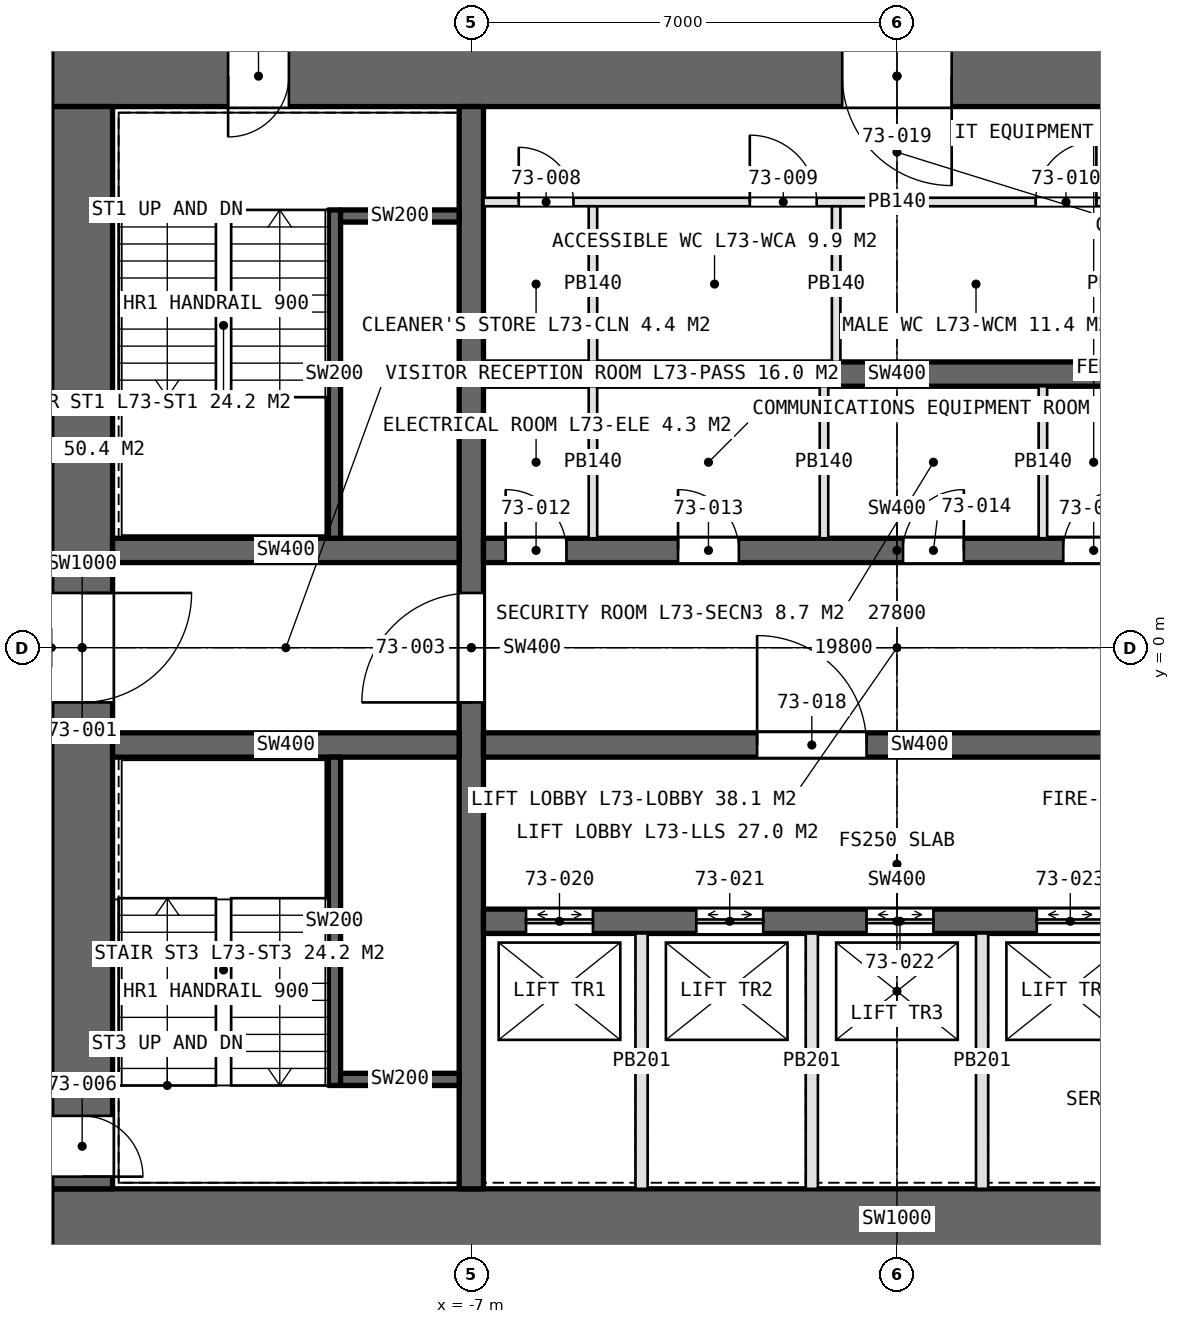
"""IFC4 building model, lengths in metres.
Left out: names, types, materials, properties, quantities, classifications, styles, units other than length and angle.
Written with IfcOpenShell. Run it as: python <this file> out.ifc"""

import sys

from ifc_helpers import new_model, si_unit, direction, frame, frame_2d, origin, place, context, subcontext, project, spatial, rectangle, extrude, element, fill, save


model = new_model("IFC4")
c1 = context("Model", 3, precision=1e-05, world=origin(), true_north=direction((0.0, 1.0)))
c2 = subcontext(c1, "Body", "Model", "MODEL_VIEW")
j1 = project(units=[si_unit("LENGTHUNIT", "METRE"), si_unit("PLANEANGLEUNIT", "RADIAN")], contexts=[c1])
p1 = place(None, origin())
s1 = spatial("IfcSite", under=j1, at=p1, CompositionType="ELEMENT")
p2 = place(p1, origin())
s2 = spatial("IfcBuilding", under=s1, at=p2, CompositionType="ELEMENT")
p3 = place(p2, frame((0.0, 0.0, 325.8)))
s3 = spatial("IfcBuildingStorey", under=s2, at=p3, CompositionType="ELEMENT", Elevation=325.8)
p4 = place(p3, frame((-13.9, -9.4, 0.0), z_axis=(0.0, 0.0, 1.0), x_axis=(1.0, 0.0, 0.0)))
e1 = element("IfcWall", 1, at=p4, inside=s3, PredefinedType="SHEAR", context=c2, shape_type="SweptSolid", body=[
    extrude(rectangle(XDim=27.8, YDim=1.0, at=frame_2d((13.9, 0.0))), origin(), (0.0, 0.0, 1.0), 4.2),
])
p5 = place(p4, frame((22.95, 0.0, 0.0)))
e2 = element("IfcOpeningElement", 2, at=p5, cuts=e1, PredefinedType="OPENING", context=c2, shape_type="SweptSolid", body=[
    extrude(rectangle(XDim=2.2, YDim=2.7, at=frame_2d((1.1, 1.35))), frame((0.0, 0.51, 0.0), z_axis=(0.0, -1.0, 0.0), x_axis=(1.0, 0.0, 0.0)), (0.0, 0.0, 1.0), 1.02),
])
p6 = place(p3, frame((13.9, 9.4, 0.0), z_axis=(0.0, 0.0, 1.0), x_axis=(-1.0, 0.0, 0.0)))
e3 = element("IfcWall", 3, at=p6, inside=s3, PredefinedType="SHEAR", context=c2, shape_type="SweptSolid", body=[
    extrude(rectangle(XDim=27.8, YDim=1.0, at=frame_2d((13.9, 0.0))), origin(), (0.0, 0.0, 1.0), 4.2),
])
p7 = place(p6, frame((23.9, 0.0, 0.0)))
e4 = element("IfcOpeningElement", 4, at=p7, cuts=e3, PredefinedType="OPENING", context=c2, shape_type="SweptSolid", body=[
    extrude(rectangle(XDim=1.0, YDim=2.4, at=frame_2d((0.5, 1.2))), frame((0.0, 0.51, 0.0), z_axis=(0.0, -1.0, 0.0), x_axis=(1.0, 0.0, 0.0)), (0.0, 0.0, 1.0), 1.02),
])
p8 = place(p6, frame((13.0, 0.0, 0.0)))
e5 = element("IfcOpeningElement", 5, at=p8, cuts=e3, PredefinedType="OPENING", context=c2, shape_type="SweptSolid", body=[
    extrude(rectangle(XDim=1.8, YDim=2.4, at=frame_2d((0.9, 1.2))), frame((0.0, 0.51, 0.0), z_axis=(0.0, -1.0, 0.0), x_axis=(1.0, 0.0, 0.0)), (0.0, 0.0, 1.0), 1.02),
])
p9 = place(p3, frame((-13.4, 8.9, 0.0), z_axis=(0.0, 0.0, 1.0), x_axis=(0.0, -1.0, 0.0)))
e6 = element("IfcWall", 6, at=p9, inside=s3, PredefinedType="SHEAR", context=c2, shape_type="SweptSolid", body=[
    extrude(rectangle(XDim=17.8, YDim=1.0, at=frame_2d((8.9, 0.0))), origin(), (0.0, 0.0, 1.0), 4.2),
])
p10 = place(p9, frame((8.0, 0.0, 0.0)))
e7 = element("IfcOpeningElement", 7, at=p10, cuts=e6, PredefinedType="OPENING", context=c2, shape_type="SweptSolid", body=[
    extrude(rectangle(XDim=1.8, YDim=2.4, at=frame_2d((0.9, 1.2))), frame((0.0, 0.51, 0.0), z_axis=(0.0, -1.0, 0.0), x_axis=(1.0, 0.0, 0.0)), (0.0, 0.0, 1.0), 1.02),
])
p11 = place(p9, frame((16.6, 0.0, 0.0)))
e8 = element("IfcOpeningElement", 8, at=p11, cuts=e6, PredefinedType="OPENING", context=c2, shape_type="SweptSolid", body=[
    extrude(rectangle(XDim=1.0, YDim=2.4, at=frame_2d((0.5, 1.2))), frame((0.0, 0.51, 0.0), z_axis=(0.0, -1.0, 0.0), x_axis=(1.0, 0.0, 0.0)), (0.0, 0.0, 1.0), 1.02),
])
p12 = place(p3, frame((-7.0, -8.9, 0.0), z_axis=(0.0, 0.0, 1.0), x_axis=(0.0, 1.0, 0.0)))
e9 = element("IfcWall", 9, at=p12, inside=s3, PredefinedType="SHEAR", context=c2, shape_type="SweptSolid", body=[
    extrude(rectangle(XDim=17.8, YDim=0.4, at=frame_2d((8.9, 0.0))), origin(), (0.0, 0.0, 1.0), 4.2),
])
p13 = place(p12, frame((8.0, 0.0, 0.0)))
e10 = element("IfcOpeningElement", 10, at=p13, cuts=e9, PredefinedType="OPENING", context=c2, shape_type="SweptSolid", body=[
    extrude(rectangle(XDim=1.8, YDim=2.4, at=frame_2d((0.9, 1.2))), frame((0.0, 0.21, 0.0), z_axis=(0.0, -1.0, 0.0), x_axis=(1.0, 0.0, 0.0)), (0.0, 0.0, 1.0), 0.42),
])
p14 = place(p3, frame((-6.8, 1.6, 0.0), z_axis=(0.0, 0.0, 1.0), x_axis=(1.0, 0.0, 0.0)))
e11 = element("IfcWall", 11, at=p14, inside=s3, PredefinedType="SHEAR", context=c2, shape_type="SweptSolid", body=[
    extrude(rectangle(XDim=13.6, YDim=0.4, at=frame_2d((6.8, 0.0))), origin(), (0.0, 0.0, 1.0), 4.2),
])
p15 = place(p14, frame((0.365, 0.0, 0.0)))
e12 = element("IfcOpeningElement", 12, at=p15, cuts=e11, PredefinedType="OPENING", context=c2, shape_type="SweptSolid", body=[
    extrude(rectangle(XDim=1.0, YDim=2.4, at=frame_2d((0.5, 1.2))), frame((0.0, 0.21, 0.0), z_axis=(0.0, -1.0, 0.0), x_axis=(1.0, 0.0, 0.0)), (0.0, 0.0, 1.0), 0.42),
])
p16 = place(p14, frame((3.2, 0.0, 0.0)))
e13 = element("IfcOpeningElement", 13, at=p16, cuts=e11, PredefinedType="OPENING", context=c2, shape_type="SweptSolid", body=[
    extrude(rectangle(XDim=1.0, YDim=2.4, at=frame_2d((0.5, 1.2))), frame((0.0, 0.21, 0.0), z_axis=(0.0, -1.0, 0.0), x_axis=(1.0, 0.0, 0.0)), (0.0, 0.0, 1.0), 0.42),
])
p17 = place(p14, frame((6.9, 0.0, 0.0)))
e14 = element("IfcOpeningElement", 14, at=p17, cuts=e11, PredefinedType="OPENING", context=c2, shape_type="SweptSolid", body=[
    extrude(rectangle(XDim=1.0, YDim=2.4, at=frame_2d((0.5, 1.2))), frame((0.0, 0.21, 0.0), z_axis=(0.0, -1.0, 0.0), x_axis=(1.0, 0.0, 0.0)), (0.0, 0.0, 1.0), 0.42),
])
p18 = place(p14, frame((9.535, 0.0, 0.0)))
e15 = element("IfcOpeningElement", 15, at=p18, cuts=e11, PredefinedType="OPENING", context=c2, shape_type="SweptSolid", body=[
    extrude(rectangle(XDim=1.0, YDim=2.4, at=frame_2d((0.5, 1.2))), frame((0.0, 0.21, 0.0), z_axis=(0.0, -1.0, 0.0), x_axis=(1.0, 0.0, 0.0)), (0.0, 0.0, 1.0), 0.42),
])
p19 = place(p14, frame((11.9, 0.0, 0.0)))
e16 = element("IfcOpeningElement", 16, at=p19, cuts=e11, PredefinedType="OPENING", context=c2, shape_type="SweptSolid", body=[
    extrude(rectangle(XDim=1.0, YDim=2.4, at=frame_2d((0.5, 1.2))), frame((0.0, 0.21, 0.0), z_axis=(0.0, -1.0, 0.0), x_axis=(1.0, 0.0, 0.0)), (0.0, 0.0, 1.0), 0.42),
])
p20 = place(p3, frame((-6.8, -1.6, 0.0), z_axis=(0.0, 0.0, 1.0), x_axis=(1.0, 0.0, 0.0)))
e17 = element("IfcWall", 17, at=p20, inside=s3, PredefinedType="SHEAR", context=c2, shape_type="SweptSolid", body=[
    extrude(rectangle(XDim=13.6, YDim=0.4, at=frame_2d((6.8, 0.0))), origin(), (0.0, 0.0, 1.0), 4.2),
])
p21 = place(p20, frame((11.9, 0.0, 0.0)))
e18 = element("IfcOpeningElement", 18, at=p21, cuts=e17, PredefinedType="OPENING", context=c2, shape_type="SweptSolid", body=[
    extrude(rectangle(XDim=1.0, YDim=2.4, at=frame_2d((0.5, 1.2))), frame((0.0, 0.21, 0.0), z_axis=(0.0, -1.0, 0.0), x_axis=(1.0, 0.0, 0.0)), (0.0, 0.0, 1.0), 0.42),
])
p22 = place(p20, frame((4.5, 0.0, 0.0)))
e19 = element("IfcOpeningElement", 19, at=p22, cuts=e17, PredefinedType="OPENING", context=c2, shape_type="SweptSolid", body=[
    extrude(rectangle(XDim=1.8, YDim=2.4, at=frame_2d((0.9, 1.2))), frame((0.0, 0.21, 0.0), z_axis=(0.0, -1.0, 0.0), x_axis=(1.0, 0.0, 0.0)), (0.0, 0.0, 1.0), 0.42),
])
p23 = place(p3, frame((-6.8, 4.5, 0.0), z_axis=(0.0, 0.0, 1.0), x_axis=(1.0, 0.0, 0.0)))
e20 = element("IfcWall", 20, at=p23, inside=s3, PredefinedType="SHEAR", context=c2, shape_type="SweptSolid", body=[
    extrude(rectangle(XDim=13.6, YDim=0.4, at=frame_2d((6.8, 0.0))), origin(), (0.0, 0.0, 1.0), 4.2),
])
p24 = place(p3, frame((-6.8, -4.5, 0.0), z_axis=(0.0, 0.0, 1.0), x_axis=(1.0, 0.0, 0.0)))
e21 = element("IfcWall", 21, at=p24, inside=s3, PredefinedType="SHEAR", context=c2, shape_type="SweptSolid", body=[
    extrude(rectangle(XDim=13.6, YDim=0.4, at=frame_2d((6.8, 0.0))), origin(), (0.0, 0.0, 1.0), 4.2),
])
p25 = place(p24, frame((0.7, 0.0, 0.0)))
e22 = element("IfcOpeningElement", 22, at=p25, cuts=e21, PredefinedType="OPENING", context=c2, shape_type="SweptSolid", body=[
    extrude(rectangle(XDim=1.1, YDim=2.4, at=frame_2d((0.55, 1.2))), frame((0.0, 0.21, 0.0), z_axis=(0.0, -1.0, 0.0), x_axis=(1.0, 0.0, 0.0)), (0.0, 0.0, 1.0), 0.42),
])
p26 = place(p24, frame((3.5, 0.0, 0.0)))
e23 = element("IfcOpeningElement", 23, at=p26, cuts=e21, PredefinedType="OPENING", context=c2, shape_type="SweptSolid", body=[
    extrude(rectangle(XDim=1.1, YDim=2.4, at=frame_2d((0.55, 1.2))), frame((0.0, 0.21, 0.0), z_axis=(0.0, -1.0, 0.0), x_axis=(1.0, 0.0, 0.0)), (0.0, 0.0, 1.0), 0.42),
])
p27 = place(p24, frame((6.3, 0.0, 0.0)))
e24 = element("IfcOpeningElement", 24, at=p27, cuts=e21, PredefinedType="OPENING", context=c2, shape_type="SweptSolid", body=[
    extrude(rectangle(XDim=1.1, YDim=2.4, at=frame_2d((0.55, 1.2))), frame((0.0, 0.21, 0.0), z_axis=(0.0, -1.0, 0.0), x_axis=(1.0, 0.0, 0.0)), (0.0, 0.0, 1.0), 0.42),
])
p28 = place(p24, frame((9.1, 0.0, 0.0)))
e25 = element("IfcOpeningElement", 25, at=p28, cuts=e21, PredefinedType="OPENING", context=c2, shape_type="SweptSolid", body=[
    extrude(rectangle(XDim=1.1, YDim=2.4, at=frame_2d((0.55, 1.2))), frame((0.0, 0.21, 0.0), z_axis=(0.0, -1.0, 0.0), x_axis=(1.0, 0.0, 0.0)), (0.0, 0.0, 1.0), 0.42),
])
for number, where, z_axis, x_axis in (
    (26, (-12.9, 1.6, 0.0), (0.0, 0.0, 1.0), (1.0, 0.0, 0.0)),
    (27, (-12.9, -1.6, 0.0), (0.0, 0.0, 1.0), (1.0, 0.0, 0.0)),
):
    element("IfcWall", number, at=place(p3, frame(where, z_axis=z_axis, x_axis=x_axis)), inside=s3, PredefinedType="SHEAR", context=c2, shape_type="SweptSolid", body=[
        extrude(rectangle(XDim=5.7, YDim=0.4, at=frame_2d((2.85, 0.0))), origin(), (0.0, 0.0, 1.0), 4.2),
    ])
p29 = place(p3, frame((-6.8, 7.33, 0.0), z_axis=(0.0, 0.0, 1.0), x_axis=(1.0, 0.0, 0.0)))
e28 = element("IfcWall", 28, at=p29, inside=s3, PredefinedType="PARTITIONING", context=c2, shape_type="SweptSolid", body=[
    extrude(rectangle(XDim=13.6, YDim=0.14, at=frame_2d((6.8, 0.0))), origin(), (0.0, 0.0, 1.0), 3.95),
])
p30 = place(p29, frame((0.58, 0.0, 0.0)))
e29 = element("IfcOpeningElement", 29, at=p30, cuts=e28, PredefinedType="OPENING", context=c2, shape_type="SweptSolid", body=[
    extrude(rectangle(XDim=0.9, YDim=2.4, at=frame_2d((0.45, 1.2))), frame((0.0, 0.08, 0.0), z_axis=(0.0, -1.0, 0.0), x_axis=(1.0, 0.0, 0.0)), (0.0, 0.0, 1.0), 0.16),
])
p31 = place(p29, frame((4.38, 0.0, 0.0)))
e30 = element("IfcOpeningElement", 30, at=p31, cuts=e28, PredefinedType="OPENING", context=c2, shape_type="SweptSolid", body=[
    extrude(rectangle(XDim=1.1, YDim=2.4, at=frame_2d((0.55, 1.2))), frame((0.0, 0.08, 0.0), z_axis=(0.0, -1.0, 0.0), x_axis=(1.0, 0.0, 0.0)), (0.0, 0.0, 1.0), 0.16),
])
p32 = place(p29, frame((9.08, 0.0, 0.0)))
e31 = element("IfcOpeningElement", 31, at=p32, cuts=e28, PredefinedType="OPENING", context=c2, shape_type="SweptSolid", body=[
    extrude(rectangle(XDim=1.0, YDim=2.4, at=frame_2d((0.5, 1.2))), frame((0.0, 0.08, 0.0), z_axis=(0.0, -1.0, 0.0), x_axis=(1.0, 0.0, 0.0)), (0.0, 0.0, 1.0), 0.16),
])
p33 = place(p29, frame((12.35, 0.0, 0.0)))
e32 = element("IfcOpeningElement", 32, at=p33, cuts=e28, PredefinedType="OPENING", context=c2, shape_type="SweptSolid", body=[
    extrude(rectangle(XDim=1.0, YDim=2.4, at=frame_2d((0.5, 1.2))), frame((0.0, 0.08, 0.0), z_axis=(0.0, -1.0, 0.0), x_axis=(1.0, 0.0, 0.0)), (0.0, 0.0, 1.0), 0.16),
])
for number, where, z_axis, x_axis in (
    (33, (-5.0, 4.7, 0.0), (0.0, 0.0, 1.0), (0.0, 1.0, 0.0)),
    (34, (-1.0, 4.7, 0.0), (0.0, 0.0, 1.0), (0.0, 1.0, 0.0)),
):
    element("IfcWall", number, at=place(p3, frame(where, z_axis=z_axis, x_axis=x_axis)), inside=s3, PredefinedType="PARTITIONING", context=c2, shape_type="SweptSolid", body=[
        extrude(rectangle(XDim=2.56, YDim=0.14, at=frame_2d((1.28, 0.0))), origin(), (0.0, 0.0, 1.0), 3.95),
    ])
for number, where, z_axis, x_axis in (
    (35, (-5.0, 1.8, 0.0), (0.0, 0.0, 1.0), (0.0, 1.0, 0.0)),
    (36, (-1.2, 1.8, 0.0), (0.0, 0.0, 1.0), (0.0, 1.0, 0.0)),
    (37, (2.4, 1.8, 0.0), (0.0, 0.0, 1.0), (0.0, 1.0, 0.0)),
):
    element("IfcWall", number, at=place(p3, frame(where, z_axis=z_axis, x_axis=x_axis)), inside=s3, PredefinedType="PARTITIONING", context=c2, shape_type="SweptSolid", body=[
        extrude(rectangle(XDim=2.5, YDim=0.14, at=frame_2d((1.25, 0.0))), origin(), (0.0, 0.0, 1.0), 3.95),
    ])
for number, where, z_axis, x_axis in (
    (38, (-4.2, -4.7, 0.0), (0.0, 0.0, 1.0), (0.0, -1.0, 0.0)),
    (39, (-1.4, -4.7, 0.0), (0.0, 0.0, 1.0), (0.0, -1.0, 0.0)),
    (40, (1.4, -4.7, 0.0), (0.0, 0.0, 1.0), (0.0, -1.0, 0.0)),
):
    element("IfcWall", number, at=place(p3, frame(where, z_axis=z_axis, x_axis=x_axis)), inside=s3, PredefinedType="PARTITIONING", context=c2, shape_type="SweptSolid", body=[
        extrude(rectangle(XDim=4.2, YDim=0.2, at=frame_2d((2.1, 0.0))), origin(), (0.0, 0.0, 1.0), 4.2),
    ])
p34 = place(p3, frame((-9.25, 7.2, 0.0), z_axis=(0.0, 0.0, 1.0), x_axis=(0.0, -1.0, 0.0)))
e41 = element("IfcWall", 41, at=p34, inside=s3, PredefinedType="SOLIDWALL", context=c2, shape_type="SweptSolid", body=[
    extrude(rectangle(XDim=5.4, YDim=0.2, at=frame_2d((2.7, 0.0))), origin(), (0.0, 0.0, 1.0), 4.2),
])
p35 = place(p3, frame((-9.15, 7.1, 0.0), z_axis=(0.0, 0.0, 1.0), x_axis=(1.0, 0.0, 0.0)))
e42 = element("IfcWall", 42, at=p35, inside=s3, PredefinedType="SOLIDWALL", context=c2, shape_type="SweptSolid", body=[
    extrude(rectangle(XDim=1.95, YDim=0.2, at=frame_2d((0.975, 0.0))), origin(), (0.0, 0.0, 1.0), 4.2),
])
p36 = place(p3, frame((-9.25, -7.2, 0.0), z_axis=(0.0, 0.0, 1.0), x_axis=(0.0, 1.0, 0.0)))
e43 = element("IfcWall", 43, at=p36, inside=s3, PredefinedType="SOLIDWALL", context=c2, shape_type="SweptSolid", body=[
    extrude(rectangle(XDim=5.4, YDim=0.2, at=frame_2d((2.7, 0.0))), origin(), (0.0, 0.0, 1.0), 4.2),
])
p37 = place(p3, frame((-9.15, -7.1, 0.0), z_axis=(0.0, 0.0, 1.0), x_axis=(1.0, 0.0, 0.0)))
e44 = element("IfcWall", 44, at=p37, inside=s3, PredefinedType="SOLIDWALL", context=c2, shape_type="SweptSolid", body=[
    extrude(rectangle(XDim=1.95, YDim=0.2, at=frame_2d((0.975, 0.0))), origin(), (0.0, 0.0, 1.0), 4.2),
])
p38 = place(p10, origin())
e45 = element("IfcDoor", 45, at=p38, inside=s3, OperationType="DOUBLE_DOOR_SINGLE_SWING", PredefinedType="DOOR", context=c2, shape_type="SweptSolid", body=[
    extrude(rectangle(XDim=1.8, YDim=2.4, at=frame_2d((0.9, 1.2))), frame((0.0, 0.025, 0.0), z_axis=(0.0, -1.0, 0.0), x_axis=(1.0, 0.0, 0.0)), (0.0, 0.0, 1.0), 0.05),
])
fill(e7, e45)
p39 = place(p13, origin())
e46 = element("IfcDoor", 46, at=p39, inside=s3, OperationType="DOUBLE_DOOR_SINGLE_SWING", PredefinedType="DOOR", context=c2, shape_type="SweptSolid", body=[
    extrude(rectangle(XDim=1.8, YDim=2.4, at=frame_2d((0.9, 1.2))), frame((0.0, 0.025, 0.0), z_axis=(0.0, -1.0, 0.0), x_axis=(1.0, 0.0, 0.0)), (0.0, 0.0, 1.0), 0.05),
])
fill(e10, e46)
p40 = place(p7, origin())
e47 = element("IfcDoor", 47, at=p40, inside=s3, OperationType="SINGLE_SWING_RIGHT", PredefinedType="DOOR", context=c2, shape_type="SweptSolid", body=[
    extrude(rectangle(XDim=1.0, YDim=2.4, at=frame_2d((0.5, 1.2))), frame((0.0, 0.025, 0.0), z_axis=(0.0, -1.0, 0.0), x_axis=(1.0, 0.0, 0.0)), (0.0, 0.0, 1.0), 0.05),
])
fill(e4, e47)
p41 = place(p11, origin())
e48 = element("IfcDoor", 48, at=p41, inside=s3, OperationType="SINGLE_SWING_RIGHT", PredefinedType="DOOR", context=c2, shape_type="SweptSolid", body=[
    extrude(rectangle(XDim=1.0, YDim=2.4, at=frame_2d((0.5, 1.2))), frame((0.0, 0.025, 0.0), z_axis=(0.0, -1.0, 0.0), x_axis=(1.0, 0.0, 0.0)), (0.0, 0.0, 1.0), 0.05),
])
fill(e8, e48)
p42 = place(p30, origin())
e49 = element("IfcDoor", 49, at=p42, inside=s3, OperationType="SINGLE_SWING_LEFT", PredefinedType="DOOR", context=c2, shape_type="SweptSolid", body=[
    extrude(rectangle(XDim=0.9, YDim=2.4, at=frame_2d((0.45, 1.2))), frame((0.0, 0.025, 0.0), z_axis=(0.0, -1.0, 0.0), x_axis=(1.0, 0.0, 0.0)), (0.0, 0.0, 1.0), 0.05),
])
fill(e29, e49)
p43 = place(p31, origin())
e50 = element("IfcDoor", 50, at=p43, inside=s3, OperationType="SINGLE_SWING_LEFT", PredefinedType="DOOR", context=c2, shape_type="SweptSolid", body=[
    extrude(rectangle(XDim=1.1, YDim=2.4, at=frame_2d((0.55, 1.2))), frame((0.0, 0.025, 0.0), z_axis=(0.0, -1.0, 0.0), x_axis=(1.0, 0.0, 0.0)), (0.0, 0.0, 1.0), 0.05),
])
fill(e30, e50)
p44 = place(p32, origin())
e51 = element("IfcDoor", 51, at=p44, inside=s3, OperationType="SINGLE_SWING_RIGHT", PredefinedType="DOOR", context=c2, shape_type="SweptSolid", body=[
    extrude(rectangle(XDim=1.0, YDim=2.4, at=frame_2d((0.5, 1.2))), frame((0.0, 0.025, 0.0), z_axis=(0.0, -1.0, 0.0), x_axis=(1.0, 0.0, 0.0)), (0.0, 0.0, 1.0), 0.05),
])
fill(e31, e51)
p45 = place(p15, origin())
e52 = element("IfcDoor", 52, at=p45, inside=s3, OperationType="SINGLE_SWING_LEFT", PredefinedType="DOOR", context=c2, shape_type="SweptSolid", body=[
    extrude(rectangle(XDim=1.0, YDim=2.4, at=frame_2d((0.5, 1.2))), frame((0.0, 0.025, 0.0), z_axis=(0.0, -1.0, 0.0), x_axis=(1.0, 0.0, 0.0)), (0.0, 0.0, 1.0), 0.05),
])
fill(e12, e52)
p46 = place(p16, origin())
e53 = element("IfcDoor", 53, at=p46, inside=s3, OperationType="SINGLE_SWING_LEFT", PredefinedType="DOOR", context=c2, shape_type="SweptSolid", body=[
    extrude(rectangle(XDim=1.0, YDim=2.4, at=frame_2d((0.5, 1.2))), frame((0.0, 0.025, 0.0), z_axis=(0.0, -1.0, 0.0), x_axis=(1.0, 0.0, 0.0)), (0.0, 0.0, 1.0), 0.05),
])
fill(e13, e53)
p47 = place(p17, origin())
e54 = element("IfcDoor", 54, at=p47, inside=s3, OperationType="SINGLE_SWING_RIGHT", PredefinedType="DOOR", context=c2, shape_type="SweptSolid", body=[
    extrude(rectangle(XDim=1.0, YDim=2.4, at=frame_2d((0.5, 1.2))), frame((0.0, 0.025, 0.0), z_axis=(0.0, -1.0, 0.0), x_axis=(1.0, 0.0, 0.0)), (0.0, 0.0, 1.0), 0.05),
])
fill(e14, e54)
p48 = place(p18, origin())
e55 = element("IfcDoor", 55, at=p48, inside=s3, OperationType="SINGLE_SWING_RIGHT", PredefinedType="DOOR", context=c2, shape_type="SweptSolid", body=[
    extrude(rectangle(XDim=1.0, YDim=2.4, at=frame_2d((0.5, 1.2))), frame((0.0, 0.025, 0.0), z_axis=(0.0, -1.0, 0.0), x_axis=(1.0, 0.0, 0.0)), (0.0, 0.0, 1.0), 0.05),
])
fill(e15, e55)
p49 = place(p22, origin())
e56 = element("IfcDoor", 56, at=p49, inside=s3, OperationType="DOUBLE_DOOR_SINGLE_SWING", PredefinedType="DOOR", context=c2, shape_type="SweptSolid", body=[
    extrude(rectangle(XDim=1.8, YDim=2.4, at=frame_2d((0.9, 1.2))), frame((0.0, 0.025, 0.0), z_axis=(0.0, -1.0, 0.0), x_axis=(1.0, 0.0, 0.0)), (0.0, 0.0, 1.0), 0.05),
])
fill(e19, e56)
p50 = place(p8, origin())
e57 = element("IfcDoor", 57, at=p50, inside=s3, OperationType="DOUBLE_DOOR_SINGLE_SWING", PredefinedType="DOOR", context=c2, shape_type="SweptSolid", body=[
    extrude(rectangle(XDim=1.8, YDim=2.4, at=frame_2d((0.9, 1.2))), frame((0.0, 0.025, 0.0), z_axis=(0.0, -1.0, 0.0), x_axis=(1.0, 0.0, 0.0)), (0.0, 0.0, 1.0), 0.05),
])
fill(e5, e57)
p51 = place(p25, origin())
e58 = element("IfcDoor", 58, at=p51, inside=s3, OperationType="DOUBLE_DOOR_SLIDING", PredefinedType="DOOR", context=c2, shape_type="SweptSolid", body=[
    extrude(rectangle(XDim=1.1, YDim=2.4, at=frame_2d((0.55, 1.2))), frame((0.0, 0.025, 0.0), z_axis=(0.0, -1.0, 0.0), x_axis=(1.0, 0.0, 0.0)), (0.0, 0.0, 1.0), 0.05),
])
fill(e22, e58)
p52 = place(p26, origin())
e59 = element("IfcDoor", 59, at=p52, inside=s3, OperationType="DOUBLE_DOOR_SLIDING", PredefinedType="DOOR", context=c2, shape_type="SweptSolid", body=[
    extrude(rectangle(XDim=1.1, YDim=2.4, at=frame_2d((0.55, 1.2))), frame((0.0, 0.025, 0.0), z_axis=(0.0, -1.0, 0.0), x_axis=(1.0, 0.0, 0.0)), (0.0, 0.0, 1.0), 0.05),
])
fill(e23, e59)
p53 = place(p27, origin())
e60 = element("IfcDoor", 60, at=p53, inside=s3, OperationType="DOUBLE_DOOR_SLIDING", PredefinedType="DOOR", context=c2, shape_type="SweptSolid", body=[
    extrude(rectangle(XDim=1.1, YDim=2.4, at=frame_2d((0.55, 1.2))), frame((0.0, 0.025, 0.0), z_axis=(0.0, -1.0, 0.0), x_axis=(1.0, 0.0, 0.0)), (0.0, 0.0, 1.0), 0.05),
])
fill(e24, e60)
p54 = place(p28, origin())
e61 = element("IfcDoor", 61, at=p54, inside=s3, OperationType="DOUBLE_DOOR_SLIDING", PredefinedType="DOOR", context=c2, shape_type="SweptSolid", body=[
    extrude(rectangle(XDim=1.1, YDim=2.4, at=frame_2d((0.55, 1.2))), frame((0.0, 0.025, 0.0), z_axis=(0.0, -1.0, 0.0), x_axis=(1.0, 0.0, 0.0)), (0.0, 0.0, 1.0), 0.05),
])
fill(e25, e61)
save(model, sys.argv[1])
